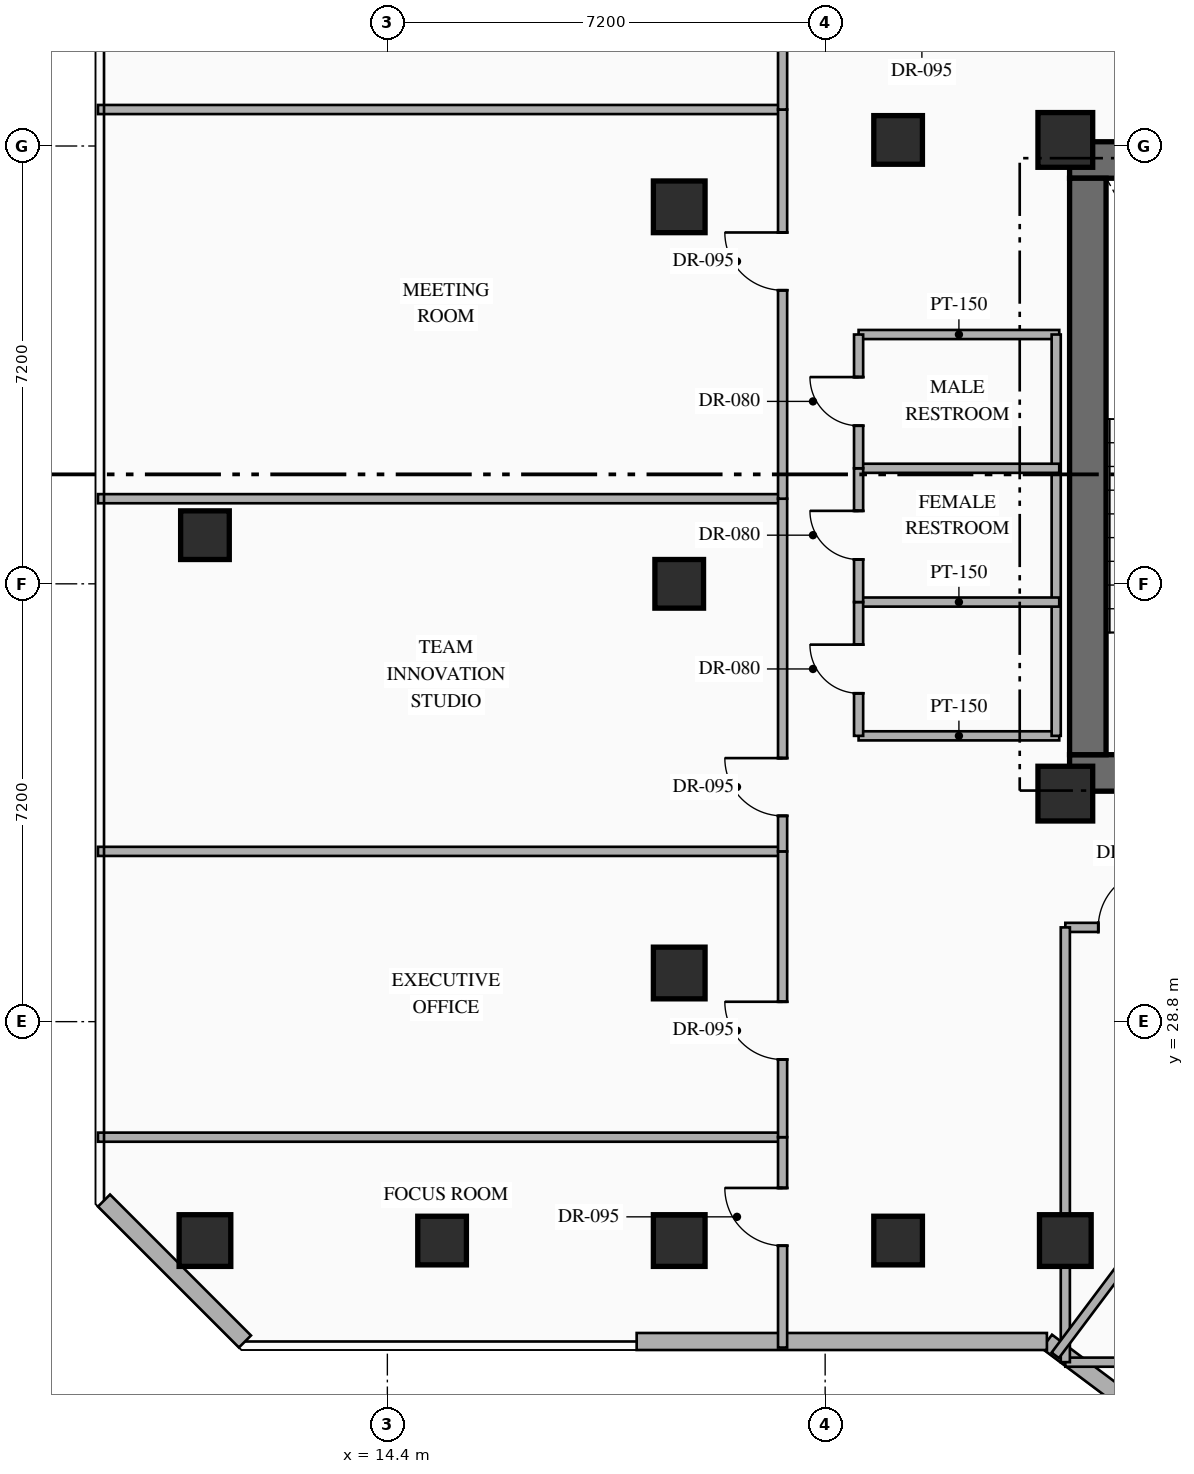
"""IFC4 building model, lengths in metres.
Left out: names, types, materials, properties, quantities, classifications, styles, units other than length and angle.
Written with IfcOpenShell. Run it as: python <this file> out.ifc"""

import sys

from ifc_helpers import new_model, si_unit, direction, frame, frame_2d, origin, origin_2d, place, context, subcontext, project, spatial, rectangle, hollow_rectangle, extrude, element, fill, save


model = new_model("IFC4")
c1 = context("Model", 3, precision=1e-05, world=origin(), true_north=direction((0.0, 1.0)))
c2 = subcontext(c1, "Body", "Model", "MODEL_VIEW")
j1 = project(units=[si_unit("LENGTHUNIT", "METRE"), si_unit("PLANEANGLEUNIT", "RADIAN")], contexts=[c1])
p1 = place(None, origin())
s1 = spatial("IfcSite", under=j1, at=p1, CompositionType="ELEMENT")
p2 = place(p1, origin())
s2 = spatial("IfcBuilding", under=s1, at=p2, CompositionType="ELEMENT")
p3 = place(p2, frame((0.0, 0.0, 145.65)))
s3 = spatial("IfcBuildingStorey", under=s2, at=p3, CompositionType="ELEMENT", Elevation=145.65)
p4 = place(p3, frame((25.62, 32.89, 0.0), z_axis=(0.0, 0.0, 1.0), x_axis=(1.0, 0.0, 0.0)))
e1 = element("IfcWall", 1, at=p4, inside=s3, PredefinedType="SHEAR", context=c2, shape_type="SweptSolid", body=[
    extrude(rectangle(XDim=7.78, YDim=0.6, at=frame_2d((3.89, 0.0))), origin(), (0.0, 0.0, 1.0), 3.6),
])
p5 = place(p4, frame((2.83, 0.0, 0.0)))
e2 = element("IfcOpeningElement", 2, at=p5, cuts=e1, PredefinedType="OPENING", context=c2, shape_type="SweptSolid", body=[
    extrude(rectangle(XDim=1.1, YDim=2.2, at=frame_2d((0.55, 1.1))), frame((0.0, 0.31, 0.0), z_axis=(0.0, -1.0, 0.0), x_axis=(1.0, 0.0, 0.0)), (0.0, 0.0, 1.0), 0.62),
])
p6 = place(p4, frame((5.58, 0.0, 0.0)))
e3 = element("IfcOpeningElement", 3, at=p6, cuts=e1, PredefinedType="OPENING", context=c2, shape_type="SweptSolid", body=[
    extrude(rectangle(XDim=1.1, YDim=2.15, at=frame_2d((0.55, 1.075))), frame((0.0, 0.31, 0.0), z_axis=(0.0, -1.0, 0.0), x_axis=(1.0, 0.0, 0.0)), (0.0, 0.0, 1.0), 0.62),
])
p7 = place(p3, frame((25.62, 42.97, 0.0), z_axis=(0.0, 0.0, 1.0), x_axis=(1.0, 0.0, 0.0)))
e4 = element("IfcWall", 4, at=p7, inside=s3, PredefinedType="SHEAR", context=c2, shape_type="SweptSolid", body=[
    extrude(rectangle(XDim=7.78, YDim=0.6, at=frame_2d((3.89, 0.0))), origin(), (0.0, 0.0, 1.0), 3.6),
])
p8 = place(p3, frame((25.92, 33.19, 0.0), z_axis=(0.0, 0.0, 1.0), x_axis=(0.0, 1.0, 0.0)))
e5 = element("IfcWall", 5, at=p8, inside=s3, PredefinedType="SHEAR", context=c2, shape_type="SweptSolid", body=[
    extrude(rectangle(XDim=9.48, YDim=0.6, at=frame_2d((4.74, 0.0))), origin(), (0.0, 0.0, 1.0), 3.6),
])
for number, where, z_axis, x_axis in (
    (6, (25.55, 32.55, 0.0), (0.0, 0.0, 1.0), (1.0, 0.0, 0.0)),
    (7, (25.55, 43.3, 0.0), (0.0, 0.0, 1.0), (1.0, 0.0, 0.0)),
):
    element("IfcColumn", number, at=place(p3, frame(where, z_axis=z_axis, x_axis=x_axis)), inside=s3, PredefinedType="COLUMN", context=c2, shape_type="SweptSolid", body=[
        extrude(rectangle(XDim=0.9, YDim=0.9, at=origin_2d()), origin(), (0.0, 0.0, 1.0), 3.6),
    ])
for number, where, z_axis, x_axis in (
    (8, (25.55, 25.2, 0.0), (0.0, 0.0, 1.0), (1.0, 0.0, 0.0)),
    (9, (11.4, 25.2, 0.0), (0.0, 0.0, 1.0), (1.0, 0.0, 0.0)),
    (10, (19.2, 25.2, 0.0), (0.0, 0.0, 1.0), (1.0, 0.0, 0.0)),
    (11, (19.2, 29.6, 0.0), (0.0, 0.0, 1.0), (1.0, 0.0, 0.0)),
    (12, (19.2, 42.2, 0.0), (0.0, 0.0, 1.0), (1.0, 0.0, 0.0)),
):
    element("IfcColumn", number, at=place(p3, frame(where, z_axis=z_axis, x_axis=x_axis)), inside=s3, PredefinedType="COLUMN", context=c2, shape_type="SweptSolid", body=[
        extrude(hollow_rectangle(XDim=0.85, YDim=0.85, WallThickness=0.032, at=origin_2d()), origin(), (0.0, 0.0, 1.0), 3.6),
    ])
for number, where, z_axis, x_axis in (
    (13, (22.8, 25.2, 0.0), (0.0, 0.0, 1.0), (1.0, 0.0, 0.0)),
    (14, (22.8, 43.3, 0.0), (0.0, 0.0, 1.0), (1.0, 0.0, 0.0)),
    (15, (11.4, 36.8, 0.0), (0.0, 0.0, 1.0), (1.0, 0.0, 0.0)),
    (16, (19.2, 36.0, 0.0), (0.0, 0.0, 1.0), (1.0, 0.0, 0.0)),
    (17, (15.3, 25.2, 0.0), (0.0, 0.0, 1.0), (1.0, 0.0, 0.0)),
):
    element("IfcColumn", number, at=place(p3, frame(where, z_axis=z_axis, x_axis=x_axis)), inside=s3, PredefinedType="COLUMN", context=c2, shape_type="SweptSolid", body=[
        extrude(hollow_rectangle(XDim=0.8, YDim=0.8, WallThickness=0.032, at=origin_2d()), origin(), (0.0, 0.0, 1.0), 3.6),
    ])
p9 = place(p3, frame((44.918, 8.787, 0.0), z_axis=(0.0, 0.0, 1.0), x_axis=(-0.800004765927, 0.599993645378, 0.0)))
e18 = element("IfcWall", 18, at=p9, inside=s3, PredefinedType="STANDARD", context=c2, shape_type="SweptSolid", body=[
    extrude(rectangle(XDim=24.588, YDim=0.28, at=frame_2d((12.294, 0.0))), origin(), (0.0, 0.0, 1.0), 3.35),
])
p10 = place(p3, frame((25.247, 23.54, 0.0), z_axis=(0.0, 0.0, 1.0), x_axis=(-1.0, 0.0, 0.0)))
e19 = element("IfcWall", 19, at=p10, inside=s3, PredefinedType="STANDARD", context=c2, shape_type="SweptSolid", body=[
    extrude(rectangle(XDim=6.747, YDim=0.28, at=frame_2d((3.374, 0.0))), origin(), (0.0, 0.0, 1.0), 3.35),
])
p11 = place(p3, frame((12.058, 23.54, 0.0), z_axis=(0.0, 0.0, 1.0), x_axis=(-0.707144017911, 0.707069542501, 0.0)))
e20 = element("IfcWall", 20, at=p11, inside=s3, PredefinedType="STANDARD", context=c2, shape_type="SweptSolid", body=[
    extrude(rectangle(XDim=3.278, YDim=0.28, at=frame_2d((1.639, 0.0))), origin(), (0.0, 0.0, 1.0), 3.35),
])
for number, where, z_axis, x_axis in (
    (21, (22.15, 33.5, 0.0), (0.0, 0.0, 1.0), (1.0, 0.0, 0.0)),
    (22, (22.15, 40.1, 0.0), (0.0, 0.0, 1.0), (1.0, 0.0, 0.0)),
):
    element("IfcWall", number, at=place(p3, frame(where, z_axis=z_axis, x_axis=x_axis)), inside=s3, PredefinedType="PARTITIONING", context=c2, shape_type="SweptSolid", body=[
        extrude(rectangle(XDim=3.3, YDim=0.15, at=frame_2d((1.65, 0.0))), origin(), (0.0, 0.0, 1.0), 3.35),
    ])
p12 = place(p3, frame((25.4, 33.5, 0.0), z_axis=(0.0, 0.0, 1.0), x_axis=(0.0, 1.0, 0.0)))
e23 = element("IfcWall", 23, at=p12, inside=s3, PredefinedType="PARTITIONING", context=c2, shape_type="SweptSolid", body=[
    extrude(rectangle(XDim=6.6, YDim=0.15, at=frame_2d((3.3, 0.0))), origin(), (0.0, 0.0, 1.0), 3.35),
])
for number, where, z_axis, x_axis in (
    (24, (22.15, 35.7, 0.0), (0.0, 0.0, 1.0), (1.0, 0.0, 0.0)),
    (25, (22.15, 37.9, 0.0), (0.0, 0.0, 1.0), (1.0, 0.0, 0.0)),
):
    element("IfcWall", number, at=place(p3, frame(where, z_axis=z_axis, x_axis=x_axis)), inside=s3, PredefinedType="PARTITIONING", context=c2, shape_type="SweptSolid", body=[
        extrude(rectangle(XDim=3.3, YDim=0.15, at=frame_2d((1.65, 0.0))), origin(), (0.0, 0.0, 1.0), 3.35),
    ])
p13 = place(p3, frame((22.15, 33.5, 0.0), z_axis=(0.0, 0.0, 1.0), x_axis=(0.0, 1.0, 0.0)))
e26 = element("IfcWall", 26, at=p13, inside=s3, PredefinedType="PARTITIONING", context=c2, shape_type="SweptSolid", body=[
    extrude(rectangle(XDim=2.2, YDim=0.15, at=frame_2d((1.1, 0.0))), origin(), (0.0, 0.0, 1.0), 3.35),
])
p14 = place(p13, frame((0.7, 0.0, 0.0)))
e27 = element("IfcOpeningElement", 27, at=p14, cuts=e26, PredefinedType="OPENING", context=c2, shape_type="SweptSolid", body=[
    extrude(rectangle(XDim=0.8, YDim=2.06, at=frame_2d((0.4, 1.03))), frame((0.0, 0.085, 0.0), z_axis=(0.0, -1.0, 0.0), x_axis=(1.0, 0.0, 0.0)), (0.0, 0.0, 1.0), 0.17),
])
p15 = place(p3, frame((22.15, 35.7, 0.0), z_axis=(0.0, 0.0, 1.0), x_axis=(0.0, 1.0, 0.0)))
e28 = element("IfcWall", 28, at=p15, inside=s3, PredefinedType="PARTITIONING", context=c2, shape_type="SweptSolid", body=[
    extrude(rectangle(XDim=2.2, YDim=0.15, at=frame_2d((1.1, 0.0))), origin(), (0.0, 0.0, 1.0), 3.35),
])
p16 = place(p15, frame((0.7, 0.0, 0.0)))
e29 = element("IfcOpeningElement", 29, at=p16, cuts=e28, PredefinedType="OPENING", context=c2, shape_type="SweptSolid", body=[
    extrude(rectangle(XDim=0.8, YDim=2.06, at=frame_2d((0.4, 1.03))), frame((0.0, 0.085, 0.0), z_axis=(0.0, -1.0, 0.0), x_axis=(1.0, 0.0, 0.0)), (0.0, 0.0, 1.0), 0.17),
])
p17 = place(p3, frame((22.15, 37.9, 0.0), z_axis=(0.0, 0.0, 1.0), x_axis=(0.0, 1.0, 0.0)))
e30 = element("IfcWall", 30, at=p17, inside=s3, PredefinedType="PARTITIONING", context=c2, shape_type="SweptSolid", body=[
    extrude(rectangle(XDim=2.2, YDim=0.15, at=frame_2d((1.1, 0.0))), origin(), (0.0, 0.0, 1.0), 3.35),
])
p18 = place(p17, frame((0.7, 0.0, 0.0)))
e31 = element("IfcOpeningElement", 31, at=p18, cuts=e30, PredefinedType="OPENING", context=c2, shape_type="SweptSolid", body=[
    extrude(rectangle(XDim=0.8, YDim=2.06, at=frame_2d((0.4, 1.03))), frame((0.0, 0.085, 0.0), z_axis=(0.0, -1.0, 0.0), x_axis=(1.0, 0.0, 0.0)), (0.0, 0.0, 1.0), 0.17),
])
p19 = place(p3, frame((25.55, 23.2, 0.0), z_axis=(0.0, 0.0, 1.0), x_axis=(1.0, 0.0, 0.0)))
e32 = element("IfcWall", 32, at=p19, inside=s3, PredefinedType="PARTITIONING", context=c2, shape_type="SweptSolid", body=[
    extrude(rectangle(XDim=4.95, YDim=0.15, at=frame_2d((2.475, 0.0))), origin(), (0.0, 0.0, 1.0), 3.35),
])
p20 = place(p3, frame((25.55, 30.35, 0.0), z_axis=(0.0, 0.0, 1.0), x_axis=(1.0, 0.0, 0.0)))
e33 = element("IfcWall", 33, at=p20, inside=s3, PredefinedType="PARTITIONING", context=c2, shape_type="SweptSolid", body=[
    extrude(rectangle(XDim=4.95, YDim=0.15, at=frame_2d((2.475, 0.0))), origin(), (0.0, 0.0, 1.0), 3.35),
])
p21 = place(p20, frame((0.542, 0.0, 0.0)))
e34 = element("IfcOpeningElement", 34, at=p21, cuts=e33, PredefinedType="OPENING", context=c2, shape_type="SweptSolid", body=[
    extrude(rectangle(XDim=0.95, YDim=2.15, at=frame_2d((0.475, 1.075))), frame((0.0, 0.085, 0.0), z_axis=(0.0, -1.0, 0.0), x_axis=(1.0, 0.0, 0.0)), (0.0, 0.0, 1.0), 0.17),
])
p22 = place(p3, frame((25.55, 23.2, 0.0), z_axis=(0.0, 0.0, 1.0), x_axis=(0.0, 1.0, 0.0)))
e35 = element("IfcWall", 35, at=p22, inside=s3, PredefinedType="PARTITIONING", context=c2, shape_type="SweptSolid", body=[
    extrude(rectangle(XDim=7.15, YDim=0.15, at=frame_2d((3.575, 0.0))), origin(), (0.0, 0.0, 1.0), 2.695),
])
p23 = place(p3, frame((9.64, 26.9, 0.0), z_axis=(0.0, 0.0, 1.0), x_axis=(1.0, 0.0, 0.0)))
e36 = element("IfcWall", 36, at=p23, inside=s3, PredefinedType="PARTITIONING", context=c2, shape_type="SweptSolid", body=[
    extrude(rectangle(XDim=11.26, YDim=0.15, at=frame_2d((5.63, 0.0))), origin(), (0.0, 0.0, 1.0), 3.35),
])
p24 = place(p3, frame((20.9, 23.44, 0.0), z_axis=(0.0, 0.0, 1.0), x_axis=(0.0, 1.0, 0.0)))
e37 = element("IfcWall", 37, at=p24, inside=s3, PredefinedType="PARTITIONING", context=c2, shape_type="SweptSolid", body=[
    extrude(rectangle(XDim=3.46, YDim=0.15, at=frame_2d((1.73, 0.0))), origin(), (0.0, 0.0, 1.0), 3.35),
])
p25 = place(p24, frame((1.675, 0.0, 0.0)))
e38 = element("IfcOpeningElement", 38, at=p25, cuts=e37, PredefinedType="OPENING", context=c2, shape_type="SweptSolid", body=[
    extrude(rectangle(XDim=0.95, YDim=2.15, at=frame_2d((0.475, 1.075))), frame((0.0, 0.085, 0.0), z_axis=(0.0, -1.0, 0.0), x_axis=(1.0, 0.0, 0.0)), (0.0, 0.0, 1.0), 0.17),
])
p26 = place(p3, frame((9.64, 31.6, 0.0), z_axis=(0.0, 0.0, 1.0), x_axis=(1.0, 0.0, 0.0)))
e39 = element("IfcWall", 39, at=p26, inside=s3, PredefinedType="PARTITIONING", context=c2, shape_type="SweptSolid", body=[
    extrude(rectangle(XDim=11.26, YDim=0.15, at=frame_2d((5.63, 0.0))), origin(), (0.0, 0.0, 1.0), 3.35),
])
p27 = place(p3, frame((20.9, 26.9, 0.0), z_axis=(0.0, 0.0, 1.0), x_axis=(0.0, 1.0, 0.0)))
e40 = element("IfcWall", 40, at=p27, inside=s3, PredefinedType="PARTITIONING", context=c2, shape_type="SweptSolid", body=[
    extrude(rectangle(XDim=4.7, YDim=0.15, at=frame_2d((2.35, 0.0))), origin(), (0.0, 0.0, 1.0), 3.35),
])
p28 = place(p27, frame((1.277, 0.0, 0.0)))
e41 = element("IfcOpeningElement", 41, at=p28, cuts=e40, PredefinedType="OPENING", context=c2, shape_type="SweptSolid", body=[
    extrude(rectangle(XDim=0.95, YDim=2.15, at=frame_2d((0.475, 1.075))), frame((0.0, 0.085, 0.0), z_axis=(0.0, -1.0, 0.0), x_axis=(1.0, 0.0, 0.0)), (0.0, 0.0, 1.0), 0.17),
])
p29 = place(p3, frame((9.64, 37.4, 0.0), z_axis=(0.0, 0.0, 1.0), x_axis=(1.0, 0.0, 0.0)))
e42 = element("IfcWall", 42, at=p29, inside=s3, PredefinedType="PARTITIONING", context=c2, shape_type="SweptSolid", body=[
    extrude(rectangle(XDim=11.26, YDim=0.15, at=frame_2d((5.63, 0.0))), origin(), (0.0, 0.0, 1.0), 3.35),
])
p30 = place(p3, frame((20.9, 31.6, 0.0), z_axis=(0.0, 0.0, 1.0), x_axis=(0.0, 1.0, 0.0)))
e43 = element("IfcWall", 43, at=p30, inside=s3, PredefinedType="PARTITIONING", context=c2, shape_type="SweptSolid", body=[
    extrude(rectangle(XDim=5.8, YDim=0.15, at=frame_2d((2.9, 0.0))), origin(), (0.0, 0.0, 1.0), 3.35),
])
p31 = place(p30, frame((0.584, 0.0, 0.0)))
e44 = element("IfcOpeningElement", 44, at=p31, cuts=e43, PredefinedType="OPENING", context=c2, shape_type="SweptSolid", body=[
    extrude(rectangle(XDim=0.95, YDim=2.15, at=frame_2d((0.475, 1.075))), frame((0.0, 0.085, 0.0), z_axis=(0.0, -1.0, 0.0), x_axis=(1.0, 0.0, 0.0)), (0.0, 0.0, 1.0), 0.17),
])
p32 = place(p3, frame((9.64, 43.8, 0.0), z_axis=(0.0, 0.0, 1.0), x_axis=(1.0, 0.0, 0.0)))
e45 = element("IfcWall", 45, at=p32, inside=s3, PredefinedType="PARTITIONING", context=c2, shape_type="SweptSolid", body=[
    extrude(rectangle(XDim=11.26, YDim=0.15, at=frame_2d((5.63, 0.0))), origin(), (0.0, 0.0, 1.0), 3.35),
])
p33 = place(p3, frame((20.9, 37.4, 0.0), z_axis=(0.0, 0.0, 1.0), x_axis=(0.0, 1.0, 0.0)))
e46 = element("IfcWall", 46, at=p33, inside=s3, PredefinedType="PARTITIONING", context=c2, shape_type="SweptSolid", body=[
    extrude(rectangle(XDim=6.4, YDim=0.15, at=frame_2d((3.2, 0.0))), origin(), (0.0, 0.0, 1.0), 3.35),
])
p34 = place(p33, frame((3.428, 0.0, 0.0)))
e47 = element("IfcOpeningElement", 47, at=p34, cuts=e46, PredefinedType="OPENING", context=c2, shape_type="SweptSolid", body=[
    extrude(rectangle(XDim=0.95, YDim=2.15, at=frame_2d((0.475, 1.075))), frame((0.0, 0.085, 0.0), z_axis=(0.0, -1.0, 0.0), x_axis=(1.0, 0.0, 0.0)), (0.0, 0.0, 1.0), 0.17),
])
p35 = place(p3, frame((20.9, 43.8, 0.0), z_axis=(0.0, 0.0, 1.0), x_axis=(0.0, 1.0, 0.0)))
e48 = element("IfcWall", 48, at=p35, inside=s3, PredefinedType="PARTITIONING", context=c2, shape_type="SweptSolid", body=[
    extrude(rectangle(XDim=6.56, YDim=0.15, at=frame_2d((3.28, 0.0))), origin(), (0.0, 0.0, 1.0), 3.35),
])
p36 = place(p35, frame((2.805, 0.0, 0.0)))
e49 = element("IfcOpeningElement", 49, at=p36, cuts=e48, PredefinedType="OPENING", context=c2, shape_type="SweptSolid", body=[
    extrude(rectangle(XDim=0.95, YDim=2.15, at=frame_2d((0.475, 1.075))), frame((0.0, 0.085, 0.0), z_axis=(0.0, -1.0, 0.0), x_axis=(1.0, 0.0, 0.0)), (0.0, 0.0, 1.0), 0.17),
])
p37 = place(p3, frame((25.384, 23.312, 0.0), z_axis=(0.0, 0.0, 1.0), x_axis=(0.599990721155, 0.80000695905, 0.0)))
e50 = element("IfcWall", 50, at=p37, inside=s3, PredefinedType="PARTITIONING", context=c2, shape_type="SweptSolid", body=[
    extrude(rectangle(XDim=4.21, YDim=0.15, at=frame_2d((2.105, 0.0))), origin(), (0.0, 0.0, 1.0), 3.35),
])
p38 = place(p14, origin())
e51 = element("IfcDoor", 51, at=p38, inside=s3, OperationType="SINGLE_SWING_RIGHT", PredefinedType="DOOR", context=c2, shape_type="SweptSolid", body=[
    extrude(rectangle(XDim=0.8, YDim=2.06, at=frame_2d((0.4, 1.03))), frame((0.0, 0.025, 0.0), z_axis=(0.0, -1.0, 0.0), x_axis=(1.0, 0.0, 0.0)), (0.0, 0.0, 1.0), 0.05),
])
fill(e27, e51)
p39 = place(p16, origin())
e52 = element("IfcDoor", 52, at=p39, inside=s3, OperationType="SINGLE_SWING_RIGHT", PredefinedType="DOOR", context=c2, shape_type="SweptSolid", body=[
    extrude(rectangle(XDim=0.8, YDim=2.06, at=frame_2d((0.4, 1.03))), frame((0.0, 0.025, 0.0), z_axis=(0.0, -1.0, 0.0), x_axis=(1.0, 0.0, 0.0)), (0.0, 0.0, 1.0), 0.05),
])
fill(e29, e52)
p40 = place(p18, origin())
e53 = element("IfcDoor", 53, at=p40, inside=s3, OperationType="SINGLE_SWING_RIGHT", PredefinedType="DOOR", context=c2, shape_type="SweptSolid", body=[
    extrude(rectangle(XDim=0.8, YDim=2.06, at=frame_2d((0.4, 1.03))), frame((0.0, 0.025, 0.0), z_axis=(0.0, -1.0, 0.0), x_axis=(1.0, 0.0, 0.0)), (0.0, 0.0, 1.0), 0.05),
])
fill(e31, e53)
p41 = place(p21, origin())
e54 = element("IfcDoor", 54, at=p41, inside=s3, OperationType="SINGLE_SWING_RIGHT", PredefinedType="DOOR", context=c2, shape_type="SweptSolid", body=[
    extrude(rectangle(XDim=0.95, YDim=2.15, at=frame_2d((0.475, 1.075))), frame((0.0, 0.025, 0.0), z_axis=(0.0, -1.0, 0.0), x_axis=(1.0, 0.0, 0.0)), (0.0, 0.0, 1.0), 0.05),
])
fill(e34, e54)
p42 = place(p25, origin())
e55 = element("IfcDoor", 55, at=p42, inside=s3, OperationType="SINGLE_SWING_RIGHT", PredefinedType="DOOR", context=c2, shape_type="SweptSolid", body=[
    extrude(rectangle(XDim=0.95, YDim=2.15, at=frame_2d((0.475, 1.075))), frame((0.0, 0.025, 0.0), z_axis=(0.0, -1.0, 0.0), x_axis=(1.0, 0.0, 0.0)), (0.0, 0.0, 1.0), 0.05),
])
fill(e38, e55)
p43 = place(p28, origin())
e56 = element("IfcDoor", 56, at=p43, inside=s3, OperationType="SINGLE_SWING_RIGHT", PredefinedType="DOOR", context=c2, shape_type="SweptSolid", body=[
    extrude(rectangle(XDim=0.95, YDim=2.15, at=frame_2d((0.475, 1.075))), frame((0.0, 0.025, 0.0), z_axis=(0.0, -1.0, 0.0), x_axis=(1.0, 0.0, 0.0)), (0.0, 0.0, 1.0), 0.05),
])
fill(e41, e56)
p44 = place(p31, origin())
e57 = element("IfcDoor", 57, at=p44, inside=s3, OperationType="SINGLE_SWING_RIGHT", PredefinedType="DOOR", context=c2, shape_type="SweptSolid", body=[
    extrude(rectangle(XDim=0.95, YDim=2.15, at=frame_2d((0.475, 1.075))), frame((0.0, 0.025, 0.0), z_axis=(0.0, -1.0, 0.0), x_axis=(1.0, 0.0, 0.0)), (0.0, 0.0, 1.0), 0.05),
])
fill(e44, e57)
p45 = place(p34, origin())
e58 = element("IfcDoor", 58, at=p45, inside=s3, OperationType="SINGLE_SWING_RIGHT", PredefinedType="DOOR", context=c2, shape_type="SweptSolid", body=[
    extrude(rectangle(XDim=0.95, YDim=2.15, at=frame_2d((0.475, 1.075))), frame((0.0, 0.025, 0.0), z_axis=(0.0, -1.0, 0.0), x_axis=(1.0, 0.0, 0.0)), (0.0, 0.0, 1.0), 0.05),
])
fill(e47, e58)
save(model, sys.argv[1])
